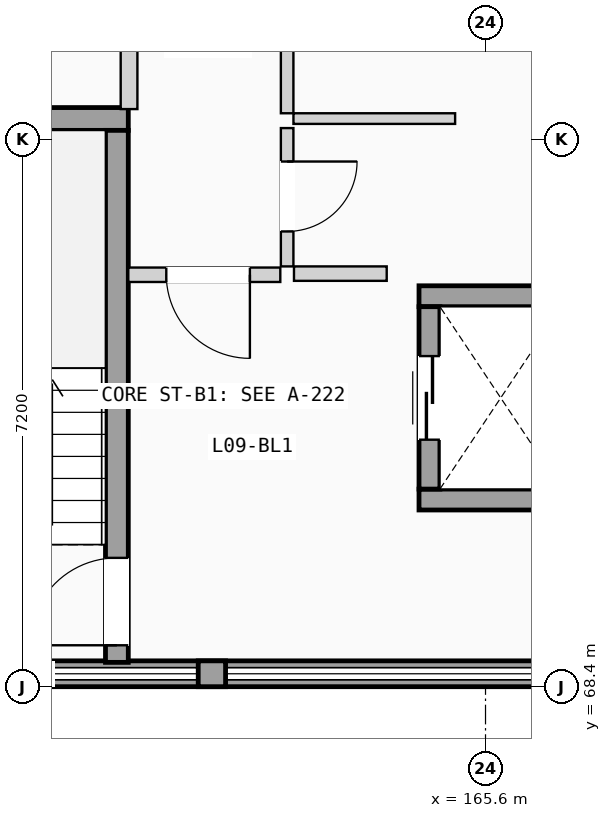
"""IFC4 building model, lengths in metres.
Left out: names, types, materials, properties, quantities, classifications, styles, units other than length and angle.
Written with IfcOpenShell. Run it as: python <this file> out.ifc"""

import sys

from ifc_helpers import new_model, si_unit, direction, frame, frame_2d, origin, place, context, subcontext, project, spatial, rectangle, extrude, element, fill, save


model = new_model("IFC4")
c1 = context("Model", 3, precision=1e-05, world=origin(), true_north=direction((0.0, 1.0)))
c2 = subcontext(c1, "Body", "Model", "MODEL_VIEW")
j1 = project(units=[si_unit("LENGTHUNIT", "METRE"), si_unit("PLANEANGLEUNIT", "RADIAN")], contexts=[c1])
p1 = place(None, origin())
s1 = spatial("IfcSite", under=j1, at=p1, CompositionType="ELEMENT")
p2 = place(p1, origin())
s2 = spatial("IfcBuilding", under=s1, at=p2, CompositionType="ELEMENT")
p3 = place(p2, frame((0.0, 0.0, 30.975)))
s3 = spatial("IfcBuildingStorey", under=s2, at=p3, CompositionType="ELEMENT", Elevation=30.975)
p4 = place(p3, frame((151.2, 68.57, 0.0), z_axis=(0.0, 0.0, 1.0), x_axis=(1.0, 0.0, 0.0)))
e1 = element("IfcWall", 1, at=p4, inside=s3, PredefinedType="SOLIDWALL", context=c2, shape_type="SweptSolid", body=[
    extrude(rectangle(XDim=21.6, YDim=0.34, at=frame_2d((10.8, 0.0))), origin(), (0.0, 0.0, 1.0), 1.11),
])
p5 = place(p3, frame((161.82, 68.57, 1.11), z_axis=(0.0, 0.0, 1.0), x_axis=(1.0, 0.0, 0.0)))
e2 = element("IfcWall", 2, at=p5, inside=s3, PredefinedType="SOLIDWALL", context=c2, shape_type="SweptSolid", body=[
    extrude(rectangle(XDim=0.36, YDim=0.34, at=frame_2d((0.18, 0.0))), origin(), (0.0, 0.0, 1.0), 1.79),
])
p6 = place(p3, frame((156.9, 75.87, 0.0), z_axis=(0.0, 0.0, 1.0), x_axis=(1.0, 0.0, 0.0)))
e3 = element("IfcWall", 3, at=p6, inside=s3, PredefinedType="SHEAR", context=c2, shape_type="SweptSolid", body=[
    extrude(rectangle(XDim=4.0, YDim=0.3, at=frame_2d((2.0, 0.0))), origin(), (0.0, 0.0, 1.0), 2.9),
])
p7 = place(p3, frame((160.75, 68.72, 0.0), z_axis=(0.0, 0.0, 1.0), x_axis=(0.0, 1.0, 0.0)))
e4 = element("IfcWall", 4, at=p7, inside=s3, PredefinedType="SHEAR", context=c2, shape_type="SweptSolid", body=[
    extrude(rectangle(XDim=7.0, YDim=0.3, at=frame_2d((3.5, 0.0))), origin(), (0.0, 0.0, 1.0), 2.9),
])
p8 = place(p7, frame((0.225, 0.0, 0.0)))
e5 = element("IfcOpeningElement", 5, at=p8, cuts=e4, PredefinedType="OPENING", context=c2, shape_type="SweptSolid", body=[
    extrude(rectangle(XDim=1.15, YDim=2.12, at=frame_2d((0.575, 1.06))), frame((0.0, 0.16, 0.0), z_axis=(0.0, -1.0, 0.0), x_axis=(1.0, 0.0, 0.0)), (0.0, 0.0, 1.0), 0.32),
])
for number, where, z_axis, x_axis in (
    (6, (164.725, 70.863, 0.0), (0.0, 0.0, 1.0), (1.0, 0.0, 0.0)),
    (7, (164.725, 73.538, 0.0), (0.0, 0.0, 1.0), (1.0, 0.0, 0.0)),
):
    element("IfcWall", number, at=place(p3, frame(where, z_axis=z_axis, x_axis=x_axis)), inside=s3, PredefinedType="SHEAR", context=c2, shape_type="SweptSolid", body=[
        extrude(rectangle(XDim=2.15, YDim=0.275, at=frame_2d((1.075, 0.0))), origin(), (0.0, 0.0, 1.0), 2.9),
    ])
p9 = place(p3, frame((164.863, 71.0, 0.0), z_axis=(0.0, 0.0, 1.0), x_axis=(0.0, 1.0, 0.0)))
e8 = element("IfcWall", 8, at=p9, inside=s3, PredefinedType="SHEAR", context=c2, shape_type="SweptSolid", body=[
    extrude(rectangle(XDim=2.4, YDim=0.275, at=frame_2d((1.2, 0.0))), origin(), (0.0, 0.0, 1.0), 2.9),
])
p10 = place(p9, frame((0.65, 0.0, 0.0)))
e9 = element("IfcOpeningElement", 9, at=p10, cuts=e8, PredefinedType="OPENING", context=c2, shape_type="SweptSolid", body=[
    extrude(rectangle(XDim=1.1, YDim=2.15, at=frame_2d((0.55, 1.075))), frame((0.0, 0.147, 0.0), z_axis=(0.0, -1.0, 0.0), x_axis=(1.0, 0.0, 0.0)), (0.0, 0.0, 1.0), 0.295),
])
p11 = place(p3, frame((163.08, 73.835, 0.0), z_axis=(0.0, 0.0, 1.0), x_axis=(1.0, 0.0, 0.0)))
e10 = element("IfcWall", 10, at=p11, inside=s3, PredefinedType="PARTITIONING", context=c2, shape_type="SweptSolid", body=[
    extrude(rectangle(XDim=1.22, YDim=0.19, at=frame_2d((0.61, 0.0))), origin(), (0.0, 0.0, 1.0), 2.87),
])
p12 = place(p3, frame((160.9, 73.82, 0.0), z_axis=(0.0, 0.0, 1.0), x_axis=(1.0, 0.0, 0.0)))
e11 = element("IfcWall", 11, at=p12, inside=s3, PredefinedType="PARTITIONING", context=c2, shape_type="SweptSolid", body=[
    extrude(rectangle(XDim=2.0, YDim=0.19, at=frame_2d((1.0, 0.0))), origin(), (0.0, 0.0, 1.0), 2.87),
])
p13 = place(p12, frame((0.5, 0.0, 0.0)))
e12 = element("IfcOpeningElement", 12, at=p13, cuts=e11, PredefinedType="OPENING", context=c2, shape_type="SweptSolid", body=[
    extrude(rectangle(XDim=1.1, YDim=2.12, at=frame_2d((0.55, 1.06))), frame((0.0, 0.105, 0.0), z_axis=(0.0, -1.0, 0.0), x_axis=(1.0, 0.0, 0.0)), (0.0, 0.0, 1.0), 0.21),
])
p14 = place(p3, frame((162.99, 73.93, 0.0), z_axis=(0.0, 0.0, 1.0), x_axis=(0.0, 1.0, 0.0)))
e13 = element("IfcWall", 13, at=p14, inside=s3, PredefinedType="PARTITIONING", context=c2, shape_type="SweptSolid", body=[
    extrude(rectangle(XDim=1.82, YDim=0.165, at=frame_2d((0.91, 0.0))), origin(), (0.0, 0.0, 1.0), 2.87),
])
p15 = place(p14, frame((0.46, 0.0, 0.0)))
e14 = element("IfcOpeningElement", 14, at=p15, cuts=e13, PredefinedType="OPENING", context=c2, shape_type="SweptSolid", body=[
    extrude(rectangle(XDim=0.92, YDim=2.04, at=frame_2d((0.46, 1.02))), frame((0.0, 0.093, 0.0), z_axis=(0.0, -1.0, 0.0), x_axis=(1.0, 0.0, 0.0)), (0.0, 0.0, 1.0), 0.185),
])
p16 = place(p3, frame((163.073, 75.875, 0.0), z_axis=(0.0, 0.0, 1.0), x_axis=(1.0, 0.0, 0.0)))
e15 = element("IfcWall", 15, at=p16, inside=s3, PredefinedType="PARTITIONING", context=c2, shape_type="SweptSolid", body=[
    extrude(rectangle(XDim=2.127, YDim=0.14, at=frame_2d((1.063, 0.0))), origin(), (0.0, 0.0, 1.0), 2.87),
])
p17 = place(p3, frame((160.91, 76.0, 0.0), z_axis=(0.0, 0.0, 1.0), x_axis=(0.0, 1.0, 0.0)))
e16 = element("IfcWall", 16, at=p17, inside=s3, PredefinedType="PLUMBINGWALL", context=c2, shape_type="SweptSolid", body=[
    extrude(rectangle(XDim=3.493, YDim=0.22, at=frame_2d((1.747, 0.0))), origin(), (0.0, 0.0, 1.0), 2.87),
])
p18 = place(p3, frame((162.99, 75.945, 0.0), z_axis=(0.0, 0.0, 1.0), x_axis=(0.0, 1.0, 0.0)))
e17 = element("IfcWall", 17, at=p18, inside=s3, PredefinedType="PARTITIONING", context=c2, shape_type="SweptSolid", body=[
    extrude(rectangle(XDim=5.728, YDim=0.165, at=frame_2d((2.864, 0.0))), origin(), (0.0, 0.0, 1.0), 2.87),
])
p19 = place(p18, frame((2.402, 0.0, 0.0)))
e18 = element("IfcOpeningElement", 18, at=p19, cuts=e17, PredefinedType="OPENING", context=c2, shape_type="SweptSolid", body=[
    extrude(rectangle(XDim=0.98, YDim=2.08, at=frame_2d((0.49, 1.04))), frame((0.0, 0.093, 0.0), z_axis=(0.0, -1.0, 0.0), x_axis=(1.0, 0.0, 0.0)), (0.0, 0.0, 1.0), 0.185),
])
p20 = place(p8, origin())
e19 = element("IfcDoor", 19, at=p20, inside=s3, OperationType="SINGLE_SWING_LEFT", PredefinedType="DOOR", context=c2, shape_type="SweptSolid", body=[
    extrude(rectangle(XDim=1.15, YDim=2.12, at=frame_2d((0.575, 1.06))), frame((0.0, 0.025, 0.0), z_axis=(0.0, -1.0, 0.0), x_axis=(1.0, 0.0, 0.0)), (0.0, 0.0, 1.0), 0.05),
])
fill(e5, e19)
p21 = place(p10, origin())
e20 = element("IfcDoor", 20, at=p21, inside=s3, OperationType="SLIDING_TO_LEFT", PredefinedType="DOOR", context=c2, shape_type="SweptSolid", body=[
    extrude(rectangle(XDim=1.1, YDim=2.15, at=frame_2d((0.55, 1.075))), frame((0.0, 0.025, 0.0), z_axis=(0.0, -1.0, 0.0), x_axis=(1.0, 0.0, 0.0)), (0.0, 0.0, 1.0), 0.05),
])
fill(e9, e20)
p22 = place(p13, frame((1.1, 0.0, 0.0), z_axis=(0.0, 0.0, 1.0), x_axis=(-1.0, 0.0, 0.0)))
e21 = element("IfcDoor", 21, at=p22, inside=s3, OperationType="SINGLE_SWING_RIGHT", PredefinedType="DOOR", context=c2, shape_type="SweptSolid", body=[
    extrude(rectangle(XDim=1.1, YDim=2.12, at=frame_2d((0.55, 1.06))), frame((0.0, 0.025, 0.0), z_axis=(0.0, -1.0, 0.0), x_axis=(1.0, 0.0, 0.0)), (0.0, 0.0, 1.0), 0.05),
])
fill(e12, e21)
p23 = place(p15, frame((0.92, 0.0, 0.0), z_axis=(0.0, 0.0, 1.0), x_axis=(-1.0, 0.0, 0.0)))
e22 = element("IfcDoor", 22, at=p23, inside=s3, OperationType="SINGLE_SWING_RIGHT", PredefinedType="DOOR", context=c2, shape_type="SweptSolid", body=[
    extrude(rectangle(XDim=0.92, YDim=2.04, at=frame_2d((0.46, 1.02))), frame((0.0, 0.025, 0.0), z_axis=(0.0, -1.0, 0.0), x_axis=(1.0, 0.0, 0.0)), (0.0, 0.0, 1.0), 0.05),
])
fill(e14, e22)
save(model, sys.argv[1])
